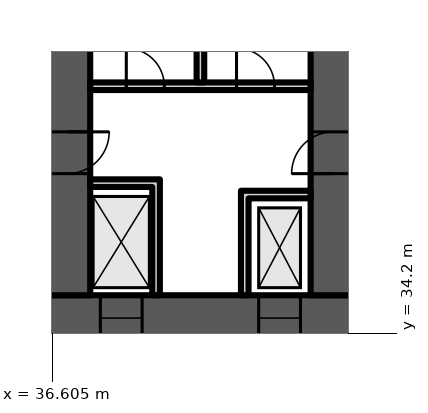
"""IFC4 building model, lengths in metres.
Left out: names, types, materials, properties, quantities, classifications, styles, units other than length and angle.
Written with IfcOpenShell. Run it as: python <this file> out.ifc"""

import sys

from ifc_helpers import new_model, si_unit, direction, frame, frame_2d, origin, place, context, subcontext, project, spatial, polyline, rectangle, outline, extrude, element, fill, save


model = new_model("IFC4")
c1 = context("Model", 3, precision=1e-05, world=origin(), true_north=direction((0.0, 1.0)))
c2 = subcontext(c1, "Body", "Model", "MODEL_VIEW")
j1 = project(units=[si_unit("LENGTHUNIT", "METRE"), si_unit("PLANEANGLEUNIT", "RADIAN")], contexts=[c1])
p1 = place(None, origin())
s1 = spatial("IfcSite", under=j1, at=p1, CompositionType="ELEMENT")
p2 = place(p1, origin())
s2 = spatial("IfcBuilding", under=s1, at=p2, CompositionType="ELEMENT")
p3 = place(p2, frame((0.0, 0.0, 15.0)))
s3 = spatial("IfcBuildingStorey", under=s2, at=p3, CompositionType="ELEMENT", Elevation=15.0)
p4 = place(p3, frame((9.0, 34.6, 0.0), z_axis=(0.0, 0.0, 1.0), x_axis=(1.0, 0.0, 0.0)))
e1 = element("IfcWall", 1, at=p4, inside=s3, PredefinedType="SHEAR", context=c2, shape_type="SweptSolid", body=[
    extrude(rectangle(XDim=56.0, YDim=1.2, at=frame_2d((28.0, 0.0))), origin(), (0.0, 0.0, 1.0), 6.2),
])
p5 = place(p4, frame((3.3, 0.0, 0.0)))
e2 = element("IfcOpeningElement", 2, at=p5, cuts=e1, PredefinedType="OPENING", context=c2, shape_type="SweptSolid", body=[
    extrude(rectangle(XDim=1.0, YDim=2.1, at=frame_2d((0.5, 1.05))), frame((0.0, 0.61, 0.0), z_axis=(0.0, -1.0, 0.0), x_axis=(1.0, 0.0, 0.0)), (0.0, 0.0, 1.0), 1.22),
])
p6 = place(p4, frame((7.867, 0.0, 0.0)))
e3 = element("IfcOpeningElement", 3, at=p6, cuts=e1, PredefinedType="OPENING", context=c2, shape_type="SweptSolid", body=[
    extrude(rectangle(XDim=1.1, YDim=2.1, at=frame_2d((0.55, 1.05))), frame((0.0, 0.61, 0.0), z_axis=(0.0, -1.0, 0.0), x_axis=(1.0, 0.0, 0.0)), (0.0, 0.0, 1.0), 1.22),
])
p7 = place(p4, frame((12.033, 0.0, 0.0)))
e4 = element("IfcOpeningElement", 4, at=p7, cuts=e1, PredefinedType="OPENING", context=c2, shape_type="SweptSolid", body=[
    extrude(rectangle(XDim=1.1, YDim=2.1, at=frame_2d((0.55, 1.05))), frame((0.0, 0.61, 0.0), z_axis=(0.0, -1.0, 0.0), x_axis=(1.0, 0.0, 0.0)), (0.0, 0.0, 1.0), 1.22),
])
p8 = place(p4, frame((9.8, 0.0, 0.0)))
e5 = element("IfcOpeningElement", 5, at=p8, cuts=e1, PredefinedType="OPENING", context=c2, shape_type="SweptSolid", body=[
    extrude(rectangle(XDim=1.4, YDim=2.1, at=frame_2d((0.7, 1.05))), frame((0.0, 0.61, 0.0), z_axis=(0.0, -1.0, 0.0), x_axis=(1.0, 0.0, 0.0)), (0.0, 0.0, 1.0), 1.22),
])
p9 = place(p4, frame((14.65, 0.0, 0.0)))
e6 = element("IfcOpeningElement", 6, at=p9, cuts=e1, PredefinedType="OPENING", context=c2, shape_type="SweptSolid", body=[
    extrude(rectangle(XDim=1.2, YDim=2.1, at=frame_2d((0.6, 1.05))), frame((0.0, 0.61, 0.0), z_axis=(0.0, -1.0, 0.0), x_axis=(1.0, 0.0, 0.0)), (0.0, 0.0, 1.0), 1.22),
])
p10 = place(p4, frame((21.867, 0.0, 0.0)))
e7 = element("IfcOpeningElement", 7, at=p10, cuts=e1, PredefinedType="OPENING", context=c2, shape_type="SweptSolid", body=[
    extrude(rectangle(XDim=1.1, YDim=2.1, at=frame_2d((0.55, 1.05))), frame((0.0, 0.61, 0.0), z_axis=(0.0, -1.0, 0.0), x_axis=(1.0, 0.0, 0.0)), (0.0, 0.0, 1.0), 1.22),
])
p11 = place(p4, frame((26.033, 0.0, 0.0)))
e8 = element("IfcOpeningElement", 8, at=p11, cuts=e1, PredefinedType="OPENING", context=c2, shape_type="SweptSolid", body=[
    extrude(rectangle(XDim=1.1, YDim=2.1, at=frame_2d((0.55, 1.05))), frame((0.0, 0.61, 0.0), z_axis=(0.0, -1.0, 0.0), x_axis=(1.0, 0.0, 0.0)), (0.0, 0.0, 1.0), 1.22),
])
p12 = place(p4, frame((23.8, 0.0, 0.0)))
e9 = element("IfcOpeningElement", 9, at=p12, cuts=e1, PredefinedType="OPENING", context=c2, shape_type="SweptSolid", body=[
    extrude(rectangle(XDim=1.4, YDim=2.1, at=frame_2d((0.7, 1.05))), frame((0.0, 0.61, 0.0), z_axis=(0.0, -1.0, 0.0), x_axis=(1.0, 0.0, 0.0)), (0.0, 0.0, 1.0), 1.22),
])
p13 = place(p4, frame((28.867, 0.0, 0.0)))
e10 = element("IfcOpeningElement", 10, at=p13, cuts=e1, PredefinedType="OPENING", context=c2, shape_type="SweptSolid", body=[
    extrude(rectangle(XDim=1.1, YDim=2.1, at=frame_2d((0.55, 1.05))), frame((0.0, 0.61, 0.0), z_axis=(0.0, -1.0, 0.0), x_axis=(1.0, 0.0, 0.0)), (0.0, 0.0, 1.0), 1.22),
])
p14 = place(p4, frame((33.033, 0.0, 0.0)))
e11 = element("IfcOpeningElement", 11, at=p14, cuts=e1, PredefinedType="OPENING", context=c2, shape_type="SweptSolid", body=[
    extrude(rectangle(XDim=1.1, YDim=2.1, at=frame_2d((0.55, 1.05))), frame((0.0, 0.61, 0.0), z_axis=(0.0, -1.0, 0.0), x_axis=(1.0, 0.0, 0.0)), (0.0, 0.0, 1.0), 1.22),
])
p15 = place(p4, frame((40.15, 0.0, 0.0)))
e12 = element("IfcOpeningElement", 12, at=p15, cuts=e1, PredefinedType="OPENING", context=c2, shape_type="SweptSolid", body=[
    extrude(rectangle(XDim=1.2, YDim=2.1, at=frame_2d((0.6, 1.05))), frame((0.0, 0.61, 0.0), z_axis=(0.0, -1.0, 0.0), x_axis=(1.0, 0.0, 0.0)), (0.0, 0.0, 1.0), 1.22),
])
p16 = place(p4, frame((44.8, 0.0, 0.0)))
e13 = element("IfcOpeningElement", 13, at=p16, cuts=e1, PredefinedType="OPENING", context=c2, shape_type="SweptSolid", body=[
    extrude(rectangle(XDim=1.4, YDim=2.1, at=frame_2d((0.7, 1.05))), frame((0.0, 0.61, 0.0), z_axis=(0.0, -1.0, 0.0), x_axis=(1.0, 0.0, 0.0)), (0.0, 0.0, 1.0), 1.22),
])
p17 = place(p4, frame((49.867, 0.0, 0.0)))
e14 = element("IfcOpeningElement", 14, at=p17, cuts=e1, PredefinedType="OPENING", context=c2, shape_type="SweptSolid", body=[
    extrude(rectangle(XDim=1.1, YDim=2.1, at=frame_2d((0.55, 1.05))), frame((0.0, 0.61, 0.0), z_axis=(0.0, -1.0, 0.0), x_axis=(1.0, 0.0, 0.0)), (0.0, 0.0, 1.0), 1.22),
])
p18 = place(p4, frame((53.5, 0.0, 0.0)))
e15 = element("IfcOpeningElement", 15, at=p18, cuts=e1, PredefinedType="OPENING", context=c2, shape_type="SweptSolid", body=[
    extrude(rectangle(XDim=1.1, YDim=2.1, at=frame_2d((0.55, 1.05))), frame((0.0, 0.61, 0.0), z_axis=(0.0, -1.0, 0.0), x_axis=(1.0, 0.0, 0.0)), (0.0, 0.0, 1.0), 1.22),
])
p19 = place(p4, frame((51.567, 0.0, 0.0)))
e16 = element("IfcOpeningElement", 16, at=p19, cuts=e1, PredefinedType="OPENING", context=c2, shape_type="SweptSolid", body=[
    extrude(rectangle(XDim=1.4, YDim=2.1, at=frame_2d((0.7, 1.05))), frame((0.0, 0.61, 0.0), z_axis=(0.0, -1.0, 0.0), x_axis=(1.0, 0.0, 0.0)), (0.0, 0.0, 1.0), 1.22),
])
p20 = place(p3, frame((37.0, 35.2, 0.0), z_axis=(0.0, 0.0, 1.0), x_axis=(0.0, 1.0, 0.0)))
e17 = element("IfcWall", 17, at=p20, inside=s3, PredefinedType="SHEAR", context=c2, shape_type="SweptSolid", body=[
    extrude(rectangle(XDim=12.8, YDim=1.2, at=frame_2d((6.4, 0.0))), origin(), (0.0, 0.0, 1.0), 6.2),
])
p21 = place(p20, frame((3.2, 0.0, 0.0)))
e18 = element("IfcOpeningElement", 18, at=p21, cuts=e17, PredefinedType="OPENING", context=c2, shape_type="SweptSolid", body=[
    extrude(rectangle(XDim=1.1, YDim=2.1, at=frame_2d((0.55, 1.05))), frame((0.0, 0.61, 0.0), z_axis=(0.0, -1.0, 0.0), x_axis=(1.0, 0.0, 0.0)), (0.0, 0.0, 1.0), 1.22),
])
p22 = place(p20, frame((9.6, 0.0, 0.0)))
e19 = element("IfcOpeningElement", 19, at=p22, cuts=e17, PredefinedType="OPENING", context=c2, shape_type="SweptSolid", body=[
    extrude(rectangle(XDim=1.0, YDim=2.1, at=frame_2d((0.5, 1.05))), frame((0.0, 0.61, 0.0), z_axis=(0.0, -1.0, 0.0), x_axis=(1.0, 0.0, 0.0)), (0.0, 0.0, 1.0), 1.22),
])
p23 = place(p3, frame((44.0, 35.2, 0.0), z_axis=(0.0, 0.0, 1.0), x_axis=(0.0, 1.0, 0.0)))
e20 = element("IfcWall", 20, at=p23, inside=s3, PredefinedType="SHEAR", context=c2, shape_type="SweptSolid", body=[
    extrude(rectangle(XDim=12.8, YDim=1.2, at=frame_2d((6.4, 0.0))), origin(), (0.0, 0.0, 1.0), 6.2),
])
p24 = place(p23, frame((3.2, 0.0, 0.0)))
e21 = element("IfcOpeningElement", 21, at=p24, cuts=e20, PredefinedType="OPENING", context=c2, shape_type="SweptSolid", body=[
    extrude(rectangle(XDim=1.1, YDim=2.1, at=frame_2d((0.55, 1.05))), frame((0.0, 0.61, 0.0), z_axis=(0.0, -1.0, 0.0), x_axis=(1.0, 0.0, 0.0)), (0.0, 0.0, 1.0), 1.22),
])
p25 = place(p23, frame((9.6, 0.0, 0.0)))
e22 = element("IfcOpeningElement", 22, at=p25, cuts=e20, PredefinedType="OPENING", context=c2, shape_type="SweptSolid", body=[
    extrude(rectangle(XDim=1.0, YDim=2.1, at=frame_2d((0.5, 1.05))), frame((0.0, 0.61, 0.0), z_axis=(0.0, -1.0, 0.0), x_axis=(1.0, 0.0, 0.0)), (0.0, 0.0, 1.0), 1.22),
])
p26 = place(p3, frame((37.6, 40.7, 0.0), z_axis=(0.0, 0.0, 1.0), x_axis=(1.0, 0.0, 0.0)))
e23 = element("IfcWall", 23, at=p26, inside=s3, PredefinedType="PARTITIONING", context=c2, shape_type="SweptSolid", body=[
    extrude(rectangle(XDim=5.8, YDim=0.2, at=frame_2d((2.9, 0.0))), origin(), (0.0, 0.0, 1.0), 6.2),
])
p27 = place(p26, frame((0.95, 0.0, 0.0)))
e24 = element("IfcOpeningElement", 24, at=p27, cuts=e23, PredefinedType="OPENING", context=c2, shape_type="SweptSolid", body=[
    extrude(rectangle(XDim=1.0, YDim=2.1, at=frame_2d((0.5, 1.05))), frame((0.0, 0.11, 0.0), z_axis=(0.0, -1.0, 0.0), x_axis=(1.0, 0.0, 0.0)), (0.0, 0.0, 1.0), 0.22),
])
p28 = place(p26, frame((3.85, 0.0, 0.0)))
e25 = element("IfcOpeningElement", 25, at=p28, cuts=e23, PredefinedType="OPENING", context=c2, shape_type="SweptSolid", body=[
    extrude(rectangle(XDim=1.0, YDim=2.1, at=frame_2d((0.5, 1.05))), frame((0.0, 0.11, 0.0), z_axis=(0.0, -1.0, 0.0), x_axis=(1.0, 0.0, 0.0)), (0.0, 0.0, 1.0), 0.22),
])
p29 = place(p3, frame((0.0, 0.0, -0.0)))
e26 = element("IfcWall", 26, at=p29, inside=s3, PredefinedType="PARTITIONING", context=c2, shape_type="SweptSolid", body=[
    extrude(outline(polyline([(41.567, 37.95), (41.767, 37.95), (43.4, 37.95), (43.4, 37.75), (41.767, 37.75), (41.767, 35.2), (41.567, 35.2), (41.567, 37.95)])), origin(), (0.0, 0.0, 1.0), 6.2),
])
p30 = place(p3, frame((0.0, 0.0, -0.0)))
e27 = element("IfcWall", 27, at=p30, inside=s3, PredefinedType="PARTITIONING", context=c2, shape_type="SweptSolid", body=[
    extrude(outline(polyline([(39.233, 38.05), (37.6, 38.05), (37.6, 38.25), (39.233, 38.25), (39.433, 38.25), (39.433, 35.2), (39.233, 35.2), (39.233, 38.05)])), origin(), (0.0, 0.0, 1.0), 6.2),
])
p31 = place(p3, frame((40.5, 40.8, 0.0), z_axis=(0.0, 0.0, 1.0), x_axis=(0.0, 1.0, 0.0)))
e28 = element("IfcWall", 28, at=p31, inside=s3, PredefinedType="PARTITIONING", context=c2, shape_type="SweptSolid", body=[
    extrude(rectangle(XDim=8.653, YDim=0.2, at=frame_2d((4.326, 0.0))), origin(), (0.0, 0.0, 1.0), 6.2),
])
p32 = place(p13, origin())
e29 = element("IfcDoor", 29, at=p32, inside=s3, OperationType="DOUBLE_DOOR_SLIDING", PredefinedType="DOOR", context=c2, shape_type="SweptSolid", body=[
    extrude(rectangle(XDim=1.1, YDim=2.1, at=frame_2d((0.55, 1.05))), frame((0.0, 0.025, 0.0), z_axis=(0.0, -1.0, 0.0), x_axis=(1.0, 0.0, 0.0)), (0.0, 0.0, 1.0), 0.05),
])
fill(e10, e29)
p33 = place(p14, origin())
e30 = element("IfcDoor", 30, at=p33, inside=s3, OperationType="DOUBLE_DOOR_SLIDING", PredefinedType="DOOR", context=c2, shape_type="SweptSolid", body=[
    extrude(rectangle(XDim=1.1, YDim=2.1, at=frame_2d((0.55, 1.05))), frame((0.0, 0.025, 0.0), z_axis=(0.0, -1.0, 0.0), x_axis=(1.0, 0.0, 0.0)), (0.0, 0.0, 1.0), 0.05),
])
fill(e11, e30)
p34 = place(p27, origin())
e31 = element("IfcDoor", 31, at=p34, inside=s3, OperationType="SINGLE_SWING_LEFT", PredefinedType="DOOR", context=c2, shape_type="SweptSolid", body=[
    extrude(rectangle(XDim=1.0, YDim=2.1, at=frame_2d((0.5, 1.05))), frame((0.0, 0.025, 0.0), z_axis=(0.0, -1.0, 0.0), x_axis=(1.0, 0.0, 0.0)), (0.0, 0.0, 1.0), 0.05),
])
fill(e24, e31)
p35 = place(p28, origin())
e32 = element("IfcDoor", 32, at=p35, inside=s3, OperationType="SINGLE_SWING_LEFT", PredefinedType="DOOR", context=c2, shape_type="SweptSolid", body=[
    extrude(rectangle(XDim=1.0, YDim=2.1, at=frame_2d((0.5, 1.05))), frame((0.0, 0.025, 0.0), z_axis=(0.0, -1.0, 0.0), x_axis=(1.0, 0.0, 0.0)), (0.0, 0.0, 1.0), 0.05),
])
fill(e25, e32)
p36 = place(p21, origin())
e33 = element("IfcDoor", 33, at=p36, inside=s3, OperationType="SINGLE_SWING_RIGHT", PredefinedType="DOOR", context=c2, shape_type="SweptSolid", body=[
    extrude(rectangle(XDim=1.1, YDim=2.1, at=frame_2d((0.55, 1.05))), frame((0.0, 0.025, 0.0), z_axis=(0.0, -1.0, 0.0), x_axis=(1.0, 0.0, 0.0)), (0.0, 0.0, 1.0), 0.05),
])
fill(e18, e33)
p37 = place(p24, origin())
e34 = element("IfcDoor", 34, at=p37, inside=s3, OperationType="SINGLE_SWING_LEFT", PredefinedType="DOOR", context=c2, shape_type="SweptSolid", body=[
    extrude(rectangle(XDim=1.1, YDim=2.1, at=frame_2d((0.55, 1.05))), frame((0.0, 0.025, 0.0), z_axis=(0.0, -1.0, 0.0), x_axis=(1.0, 0.0, 0.0)), (0.0, 0.0, 1.0), 0.05),
])
fill(e21, e34)
save(model, sys.argv[1])
